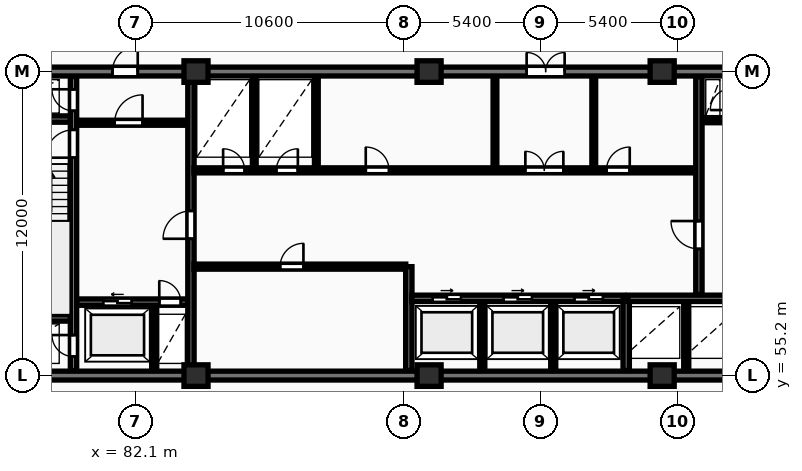
"""IFC4 building model, lengths in metres.
Left out: names, types, materials, properties, quantities, classifications, styles, units other than length and angle.
Written with IfcOpenShell. Run it as: python <this file> out.ifc"""

import sys

from ifc_helpers import new_model, si_unit, direction, frame, frame_2d, origin, origin_2d, place, context, subcontext, project, spatial, rectangle, extrude, element, fill, save


model = new_model("IFC4")
c1 = context("Model", 3, precision=1e-05, world=origin(), true_north=direction((0.0, 1.0)))
c2 = subcontext(c1, "Body", "Model", "MODEL_VIEW")
j1 = project(units=[si_unit("LENGTHUNIT", "METRE"), si_unit("PLANEANGLEUNIT", "RADIAN")], contexts=[c1])
p1 = place(None, origin())
s1 = spatial("IfcSite", under=j1, at=p1, CompositionType="ELEMENT")
p2 = place(p1, origin())
s2 = spatial("IfcBuilding", under=s1, at=p2, CompositionType="ELEMENT")
p3 = place(p2, frame((0.0, 0.0, 106.8)))
s3 = spatial("IfcBuildingStorey", under=s2, at=p3, CompositionType="ELEMENT", Elevation=106.8)
for number, where, z_axis, x_axis in (
    (1, (84.5, 55.2, 0.0), (0.0, 0.0, 1.0), (1.0, 0.0, 0.0)),
    (2, (84.5, 67.2, 0.0), (0.0, 0.0, 1.0), (1.0, 0.0, 0.0)),
    (3, (93.7, 55.2, 0.0), (0.0, 0.0, 1.0), (1.0, 0.0, 0.0)),
    (4, (93.7, 67.2, 0.0), (0.0, 0.0, 1.0), (1.0, 0.0, 0.0)),
    (5, (102.9, 55.2, 0.0), (0.0, 0.0, 1.0), (1.0, 0.0, 0.0)),
    (6, (102.9, 67.2, 0.0), (0.0, 0.0, 1.0), (1.0, 0.0, 0.0)),
):
    element("IfcColumn", number, at=place(p3, frame(where, z_axis=z_axis, x_axis=x_axis)), inside=s3, PredefinedType="COLUMN", context=c2, shape_type="SweptSolid", body=[
        extrude(rectangle(XDim=0.95, YDim=0.85, at=origin_2d()), origin(), (0.0, 0.0, 1.0), 3.25),
    ])
p4 = place(p3, frame((75.95, 55.2, 0.0), z_axis=(0.0, 0.0, 1.0), x_axis=(1.0, 0.0, 0.0)))
e7 = element("IfcWall", 7, at=p4, inside=s3, PredefinedType="SHEAR", context=c2, shape_type="SweptSolid", body=[
    extrude(rectangle(XDim=36.3, YDim=0.35, at=frame_2d((18.15, 0.0))), origin(), (0.0, 0.0, 1.0), 3.25),
])
p5 = place(p3, frame((75.95, 67.2, 0.0), z_axis=(0.0, 0.0, 1.0), x_axis=(1.0, 0.0, 0.0)))
e8 = element("IfcWall", 8, at=p5, inside=s3, PredefinedType="SHEAR", context=c2, shape_type="SweptSolid", body=[
    extrude(rectangle(XDim=36.3, YDim=0.35, at=frame_2d((18.15, 0.0))), origin(), (0.0, 0.0, 1.0), 3.25),
])
p6 = place(p5, frame((5.25, 0.0, 0.0)))
e9 = element("IfcOpeningElement", 9, at=p6, cuts=e8, PredefinedType="OPENING", context=c2, shape_type="SweptSolid", body=[
    extrude(rectangle(XDim=1.0, YDim=2.15, at=frame_2d((0.5, 1.075))), frame((0.0, 0.185, 0.0), z_axis=(0.0, -1.0, 0.0), x_axis=(1.0, 0.0, 0.0)), (0.0, 0.0, 1.0), 0.37),
])
p7 = place(p5, frame((21.6, 0.0, 0.0)))
e10 = element("IfcOpeningElement", 10, at=p7, cuts=e8, PredefinedType="OPENING", context=c2, shape_type="SweptSolid", body=[
    extrude(rectangle(XDim=1.5, YDim=2.2, at=frame_2d((0.75, 1.1))), frame((0.0, 0.185, 0.0), z_axis=(0.0, -1.0, 0.0), x_axis=(1.0, 0.0, 0.0)), (0.0, 0.0, 1.0), 0.37),
])
p8 = place(p5, frame((30.45, 0.0, 0.0)))
e11 = element("IfcOpeningElement", 11, at=p8, cuts=e8, PredefinedType="OPENING", context=c2, shape_type="SweptSolid", body=[
    extrude(rectangle(XDim=1.0, YDim=2.15, at=frame_2d((0.5, 1.075))), frame((0.0, 0.185, 0.0), z_axis=(0.0, -1.0, 0.0), x_axis=(1.0, 0.0, 0.0)), (0.0, 0.0, 1.0), 0.37),
])
p9 = place(p3, frame((79.665, 55.4, 0.0), z_axis=(0.0, 0.0, 1.0), x_axis=(0.0, 1.0, 0.0)))
e12 = element("IfcWall", 12, at=p9, inside=s3, PredefinedType="SHEAR", context=c2, shape_type="SweptSolid", body=[
    extrude(rectangle(XDim=11.6, YDim=0.25, at=frame_2d((5.8, 0.0))), origin(), (0.0, 0.0, 1.0), 3.25),
])
p10 = place(p9, frame((0.55, 0.0, 0.0)))
e13 = element("IfcOpeningElement", 13, at=p10, cuts=e12, PredefinedType="OPENING", context=c2, shape_type="SweptSolid", body=[
    extrude(rectangle(XDim=0.85, YDim=2.05, at=frame_2d((0.425, 1.025))), frame((0.0, 0.135, 0.0), z_axis=(0.0, -1.0, 0.0), x_axis=(1.0, 0.0, 0.0)), (0.0, 0.0, 1.0), 0.27),
])
p11 = place(p9, frame((8.4, 0.0, 0.0)))
e14 = element("IfcOpeningElement", 14, at=p11, cuts=e12, PredefinedType="OPENING", context=c2, shape_type="SweptSolid", body=[
    extrude(rectangle(XDim=1.1, YDim=2.1, at=frame_2d((0.55, 1.05))), frame((0.0, 0.135, 0.0), z_axis=(0.0, -1.0, 0.0), x_axis=(1.0, 0.0, 0.0)), (0.0, 0.0, 1.0), 0.27),
])
p12 = place(p9, frame((10.25, 0.0, 0.0)))
e15 = element("IfcOpeningElement", 15, at=p12, cuts=e12, PredefinedType="OPENING", context=c2, shape_type="SweptSolid", body=[
    extrude(rectangle(XDim=0.85, YDim=2.05, at=frame_2d((0.425, 1.025))), frame((0.0, 0.135, 0.0), z_axis=(0.0, -1.0, 0.0), x_axis=(1.0, 0.0, 0.0)), (0.0, 0.0, 1.0), 0.27),
])
for number, where, z_axis, x_axis in (
    (16, (76.3, 57.475, 0.0), (0.0, 0.0, 1.0), (1.0, 0.0, 0.0)),
    (17, (76.3, 65.325, 0.0), (0.0, 0.0, 1.0), (1.0, 0.0, 0.0)),
):
    element("IfcWall", number, at=place(p3, frame(where, z_axis=z_axis, x_axis=x_axis)), inside=s3, PredefinedType="SHEAR", context=c2, shape_type="SweptSolid", body=[
        extrude(rectangle(XDim=3.24, YDim=0.25, at=frame_2d((1.62, 0.0))), origin(), (0.0, 0.0, 1.0), 3.25),
    ])
p13 = place(p3, frame((79.79, 58.1, 0.0), z_axis=(0.0, 0.0, 1.0), x_axis=(1.0, 0.0, 0.0)))
e18 = element("IfcWall", 18, at=p13, inside=s3, PredefinedType="SHEAR", context=c2, shape_type="SweptSolid", body=[
    extrude(rectangle(XDim=4.39, YDim=0.25, at=frame_2d((2.195, 0.0))), origin(), (0.0, 0.0, 1.0), 3.25),
])
p14 = place(p13, frame((1.05, 0.0, 0.0)))
e19 = element("IfcOpeningElement", 19, at=p14, cuts=e18, PredefinedType="OPENING", context=c2, shape_type="SweptSolid", body=[
    extrude(rectangle(XDim=1.12, YDim=2.12, at=frame_2d((0.56, 1.06))), frame((0.0, 0.135, 0.0), z_axis=(0.0, -1.0, 0.0), x_axis=(1.0, 0.0, 0.0)), (0.0, 0.0, 1.0), 0.27),
])
p15 = place(p13, frame((3.26, 0.0, 0.0)))
e20 = element("IfcOpeningElement", 20, at=p15, cuts=e18, PredefinedType="OPENING", context=c2, shape_type="SweptSolid", body=[
    extrude(rectangle(XDim=0.85, YDim=2.05, at=frame_2d((0.425, 1.025))), frame((0.0, 0.135, 0.0), z_axis=(0.0, -1.0, 0.0), x_axis=(1.0, 0.0, 0.0)), (0.0, 0.0, 1.0), 0.27),
])
p16 = place(p3, frame((82.85, 55.4, 0.0), z_axis=(0.0, 0.0, 1.0), x_axis=(0.0, 1.0, 0.0)))
e21 = element("IfcWall", 21, at=p16, inside=s3, PredefinedType="PARTITIONING", context=c2, shape_type="SweptSolid", body=[
    extrude(rectangle(XDim=2.56, YDim=0.2, at=frame_2d((1.28, 0.0))), origin(), (0.0, 0.0, 1.0), 2.97),
])
p17 = place(p3, frame((79.79, 65.18, 0.0), z_axis=(0.0, 0.0, 1.0), x_axis=(1.0, 0.0, 0.0)))
e22 = element("IfcWall", 22, at=p17, inside=s3, PredefinedType="PARTITIONING", context=c2, shape_type="SweptSolid", body=[
    extrude(rectangle(XDim=4.39, YDim=0.2, at=frame_2d((2.195, 0.0))), origin(), (0.0, 0.0, 1.0), 2.97),
])
p18 = place(p17, frame((1.5, 0.0, 0.0)))
e23 = element("IfcOpeningElement", 23, at=p18, cuts=e22, PredefinedType="OPENING", context=c2, shape_type="SweptSolid", body=[
    extrude(rectangle(XDim=1.1, YDim=2.1, at=frame_2d((0.55, 1.05))), frame((0.0, 0.11, 0.0), z_axis=(0.0, -1.0, 0.0), x_axis=(1.0, 0.0, 0.0)), (0.0, 0.0, 1.0), 0.22),
])
p19 = place(p3, frame((84.3, 55.4, 0.0), z_axis=(0.0, 0.0, 1.0), x_axis=(0.0, 1.0, 0.0)))
e24 = element("IfcWall", 24, at=p19, inside=s3, PredefinedType="SHEAR", context=c2, shape_type="SweptSolid", body=[
    extrude(rectangle(XDim=11.6, YDim=0.25, at=frame_2d((5.8, 0.0))), origin(), (0.0, 0.0, 1.0), 3.25),
])
p20 = place(p19, frame((5.2, 0.0, 0.0)))
e25 = element("IfcOpeningElement", 25, at=p20, cuts=e24, PredefinedType="OPENING", context=c2, shape_type="SweptSolid", body=[
    extrude(rectangle(XDim=1.1, YDim=2.1, at=frame_2d((0.55, 1.05))), frame((0.0, 0.135, 0.0), z_axis=(0.0, -1.0, 0.0), x_axis=(1.0, 0.0, 0.0)), (0.0, 0.0, 1.0), 0.27),
])
p21 = place(p3, frame((84.42, 59.5, 0.0), z_axis=(0.0, 0.0, 1.0), x_axis=(1.0, 0.0, 0.0)))
e26 = element("IfcWall", 26, at=p21, inside=s3, PredefinedType="PARTITIONING", context=c2, shape_type="SweptSolid", body=[
    extrude(rectangle(XDim=8.36, YDim=0.2, at=frame_2d((4.18, 0.0))), origin(), (0.0, 0.0, 1.0), 2.97),
])
p22 = place(p21, frame((3.4, 0.0, 0.0)))
e27 = element("IfcOpeningElement", 27, at=p22, cuts=e26, PredefinedType="OPENING", context=c2, shape_type="SweptSolid", body=[
    extrude(rectangle(XDim=0.92, YDim=2.08, at=frame_2d((0.46, 1.04))), frame((0.0, 0.11, 0.0), z_axis=(0.0, -1.0, 0.0), x_axis=(1.0, 0.0, 0.0)), (0.0, 0.0, 1.0), 0.22),
])
p23 = place(p3, frame((92.9, 55.4, 0.0), z_axis=(0.0, 0.0, 1.0), x_axis=(0.0, 1.0, 0.0)))
e28 = element("IfcWall", 28, at=p23, inside=s3, PredefinedType="SHEAR", context=c2, shape_type="SweptSolid", body=[
    extrude(rectangle(XDim=4.1, YDim=0.25, at=frame_2d((2.05, 0.0))), origin(), (0.0, 0.0, 1.0), 3.25),
])
for number, where, z_axis, x_axis in (
    (29, (95.8, 55.4, 0.0), (0.0, 0.0, 1.0), (0.0, 1.0, 0.0)),
    (30, (98.6, 55.4, 0.0), (0.0, 0.0, 1.0), (0.0, 1.0, 0.0)),
):
    element("IfcWall", number, at=place(p3, frame(where, z_axis=z_axis, x_axis=x_axis)), inside=s3, PredefinedType="PARTITIONING", context=c2, shape_type="SweptSolid", body=[
        extrude(rectangle(XDim=2.72, YDim=0.2, at=frame_2d((1.36, 0.0))), origin(), (0.0, 0.0, 1.0), 2.97),
    ])
p24 = place(p3, frame((93.02, 58.25, 0.0), z_axis=(0.0, 0.0, 1.0), x_axis=(1.0, 0.0, 0.0)))
e31 = element("IfcWall", 31, at=p24, inside=s3, PredefinedType="SHEAR", context=c2, shape_type="SweptSolid", body=[
    extrude(rectangle(XDim=8.36, YDim=0.25, at=frame_2d((4.18, 0.0))), origin(), (0.0, 0.0, 1.0), 3.25),
])
p25 = place(p24, frame((0.82, 0.0, 0.0)))
e32 = element("IfcOpeningElement", 32, at=p25, cuts=e31, PredefinedType="OPENING", context=c2, shape_type="SweptSolid", body=[
    extrude(rectangle(XDim=1.12, YDim=2.12, at=frame_2d((0.56, 1.06))), frame((0.0, 0.135, 0.0), z_axis=(0.0, -1.0, 0.0), x_axis=(1.0, 0.0, 0.0)), (0.0, 0.0, 1.0), 0.27),
])
p26 = place(p24, frame((3.62, 0.0, 0.0)))
e33 = element("IfcOpeningElement", 33, at=p26, cuts=e31, PredefinedType="OPENING", context=c2, shape_type="SweptSolid", body=[
    extrude(rectangle(XDim=1.12, YDim=2.12, at=frame_2d((0.56, 1.06))), frame((0.0, 0.135, 0.0), z_axis=(0.0, -1.0, 0.0), x_axis=(1.0, 0.0, 0.0)), (0.0, 0.0, 1.0), 0.27),
])
p27 = place(p24, frame((6.42, 0.0, 0.0)))
e34 = element("IfcOpeningElement", 34, at=p27, cuts=e31, PredefinedType="OPENING", context=c2, shape_type="SweptSolid", body=[
    extrude(rectangle(XDim=1.12, YDim=2.12, at=frame_2d((0.56, 1.06))), frame((0.0, 0.135, 0.0), z_axis=(0.0, -1.0, 0.0), x_axis=(1.0, 0.0, 0.0)), (0.0, 0.0, 1.0), 0.27),
])
p28 = place(p3, frame((101.48, 55.4, 0.0), z_axis=(0.0, 0.0, 1.0), x_axis=(0.0, 1.0, 0.0)))
e35 = element("IfcWall", 35, at=p28, inside=s3, PredefinedType="SHEAR", context=c2, shape_type="SweptSolid", body=[
    extrude(rectangle(XDim=2.85, YDim=0.25, at=frame_2d((1.425, 0.0))), origin(), (0.0, 0.0, 1.0), 3.25),
])
p29 = place(p3, frame((103.85, 55.4, 0.0), z_axis=(0.0, 0.0, 1.0), x_axis=(0.0, 1.0, 0.0)))
e36 = element("IfcWall", 36, at=p29, inside=s3, PredefinedType="PARTITIONING", context=c2, shape_type="SweptSolid", body=[
    extrude(rectangle(XDim=2.72, YDim=0.2, at=frame_2d((1.36, 0.0))), origin(), (0.0, 0.0, 1.0), 2.97),
])
p30 = place(p3, frame((101.55, 58.25, 0.0), z_axis=(0.0, 0.0, 1.0), x_axis=(1.0, 0.0, 0.0)))
e37 = element("IfcWall", 37, at=p30, inside=s3, PredefinedType="SHEAR", context=c2, shape_type="SweptSolid", body=[
    extrude(rectangle(XDim=4.6, YDim=0.25, at=frame_2d((2.3, 0.0))), origin(), (0.0, 0.0, 1.0), 3.25),
])
for number, where, z_axis, x_axis in (
    (38, (86.8, 63.4, 0.0), (0.0, 0.0, 1.0), (0.0, 1.0, 0.0)),
    (39, (89.25, 63.4, 0.0), (0.0, 0.0, 1.0), (0.0, 1.0, 0.0)),
    (40, (96.3, 63.4, 0.0), (0.0, 0.0, 1.0), (0.0, 1.0, 0.0)),
    (41, (100.2, 63.4, 0.0), (0.0, 0.0, 1.0), (0.0, 1.0, 0.0)),
):
    element("IfcWall", number, at=place(p3, frame(where, z_axis=z_axis, x_axis=x_axis)), inside=s3, PredefinedType="PARTITIONING", context=c2, shape_type="SweptSolid", body=[
        extrude(rectangle(XDim=3.6, YDim=0.15, at=frame_2d((1.8, 0.0))), origin(), (0.0, 0.0, 1.0), 2.97),
    ])
p31 = place(p3, frame((84.42, 63.3, 0.0), z_axis=(0.0, 0.0, 1.0), x_axis=(1.0, 0.0, 0.0)))
e42 = element("IfcWall", 42, at=p31, inside=s3, PredefinedType="PARTITIONING", context=c2, shape_type="SweptSolid", body=[
    extrude(rectangle(XDim=19.83, YDim=0.2, at=frame_2d((9.915, 0.0))), origin(), (0.0, 0.0, 1.0), 2.97),
])
p32 = place(p31, frame((1.15, 0.0, 0.0)))
e43 = element("IfcOpeningElement", 43, at=p32, cuts=e42, PredefinedType="OPENING", context=c2, shape_type="SweptSolid", body=[
    extrude(rectangle(XDim=0.85, YDim=2.05, at=frame_2d((0.425, 1.025))), frame((0.0, 0.11, 0.0), z_axis=(0.0, -1.0, 0.0), x_axis=(1.0, 0.0, 0.0)), (0.0, 0.0, 1.0), 0.22),
])
p33 = place(p31, frame((3.25, 0.0, 0.0)))
e44 = element("IfcOpeningElement", 44, at=p33, cuts=e42, PredefinedType="OPENING", context=c2, shape_type="SweptSolid", body=[
    extrude(rectangle(XDim=0.85, YDim=2.05, at=frame_2d((0.425, 1.025))), frame((0.0, 0.11, 0.0), z_axis=(0.0, -1.0, 0.0), x_axis=(1.0, 0.0, 0.0)), (0.0, 0.0, 1.0), 0.22),
])
p34 = place(p31, frame((13.08, 0.0, 0.0)))
e45 = element("IfcOpeningElement", 45, at=p34, cuts=e42, PredefinedType="OPENING", context=c2, shape_type="SweptSolid", body=[
    extrude(rectangle(XDim=1.5, YDim=2.2, at=frame_2d((0.75, 1.1))), frame((0.0, 0.11, 0.0), z_axis=(0.0, -1.0, 0.0), x_axis=(1.0, 0.0, 0.0)), (0.0, 0.0, 1.0), 0.22),
])
p35 = place(p31, frame((6.78, 0.0, 0.0)))
e46 = element("IfcOpeningElement", 46, at=p35, cuts=e42, PredefinedType="OPENING", context=c2, shape_type="SweptSolid", body=[
    extrude(rectangle(XDim=0.92, YDim=2.08, at=frame_2d((0.46, 1.04))), frame((0.0, 0.11, 0.0), z_axis=(0.0, -1.0, 0.0), x_axis=(1.0, 0.0, 0.0)), (0.0, 0.0, 1.0), 0.22),
])
p36 = place(p31, frame((16.28, 0.0, 0.0)))
e47 = element("IfcOpeningElement", 47, at=p36, cuts=e42, PredefinedType="OPENING", context=c2, shape_type="SweptSolid", body=[
    extrude(rectangle(XDim=0.92, YDim=2.08, at=frame_2d((0.46, 1.04))), frame((0.0, 0.11, 0.0), z_axis=(0.0, -1.0, 0.0), x_axis=(1.0, 0.0, 0.0)), (0.0, 0.0, 1.0), 0.22),
])
p37 = place(p3, frame((104.45, 65.28, 0.0), z_axis=(0.0, 0.0, 1.0), x_axis=(1.0, 0.0, 0.0)))
e48 = element("IfcWall", 48, at=p37, inside=s3, PredefinedType="PARTITIONING", context=c2, shape_type="SweptSolid", body=[
    extrude(rectangle(XDim=1.2, YDim=0.2, at=frame_2d((0.6, 0.0))), origin(), (0.0, 0.0, 1.0), 2.97),
])
p38 = place(p3, frame((104.35, 58.4, 0.0), z_axis=(0.0, 0.0, 1.0), x_axis=(0.0, 1.0, 0.0)))
e49 = element("IfcWall", 49, at=p38, inside=s3, PredefinedType="SHEAR", context=c2, shape_type="SweptSolid", body=[
    extrude(rectangle(XDim=8.6, YDim=0.25, at=frame_2d((4.3, 0.0))), origin(), (0.0, 0.0, 1.0), 3.25),
])
p39 = place(p38, frame((1.8, 0.0, 0.0)))
e50 = element("IfcOpeningElement", 50, at=p39, cuts=e49, PredefinedType="OPENING", context=c2, shape_type="SweptSolid", body=[
    extrude(rectangle(XDim=1.1, YDim=2.1, at=frame_2d((0.55, 1.05))), frame((0.0, 0.135, 0.0), z_axis=(0.0, -1.0, 0.0), x_axis=(1.0, 0.0, 0.0)), (0.0, 0.0, 1.0), 0.27),
])
p40 = place(p6, origin())
e51 = element("IfcDoor", 51, at=p40, inside=s3, OperationType="SINGLE_SWING_RIGHT", PredefinedType="DOOR", context=c2, shape_type="SweptSolid", body=[
    extrude(rectangle(XDim=1.0, YDim=2.15, at=frame_2d((0.5, 1.075))), frame((0.0, 0.025, 0.0), z_axis=(0.0, -1.0, 0.0), x_axis=(1.0, 0.0, 0.0)), (0.0, 0.0, 1.0), 0.05),
])
fill(e9, e51)
p41 = place(p7, origin())
e52 = element("IfcDoor", 52, at=p41, inside=s3, OperationType="DOUBLE_DOOR_SINGLE_SWING", PredefinedType="DOOR", context=c2, shape_type="SweptSolid", body=[
    extrude(rectangle(XDim=1.5, YDim=2.2, at=frame_2d((0.75, 1.1))), frame((0.0, 0.025, 0.0), z_axis=(0.0, -1.0, 0.0), x_axis=(1.0, 0.0, 0.0)), (0.0, 0.0, 1.0), 0.05),
])
fill(e10, e52)
p42 = place(p10, origin())
e53 = element("IfcDoor", 53, at=p42, inside=s3, OperationType="SINGLE_SWING_RIGHT", PredefinedType="DOOR", context=c2, shape_type="SweptSolid", body=[
    extrude(rectangle(XDim=0.85, YDim=2.05, at=frame_2d((0.425, 1.025))), frame((0.0, 0.025, 0.0), z_axis=(0.0, -1.0, 0.0), x_axis=(1.0, 0.0, 0.0)), (0.0, 0.0, 1.0), 0.05),
])
fill(e13, e53)
p43 = place(p11, origin())
e54 = element("IfcDoor", 54, at=p43, inside=s3, OperationType="SINGLE_SWING_LEFT", PredefinedType="DOOR", context=c2, shape_type="SweptSolid", body=[
    extrude(rectangle(XDim=1.1, YDim=2.1, at=frame_2d((0.55, 1.05))), frame((0.0, 0.025, 0.0), z_axis=(0.0, -1.0, 0.0), x_axis=(1.0, 0.0, 0.0)), (0.0, 0.0, 1.0), 0.05),
])
fill(e14, e54)
p44 = place(p12, origin())
e55 = element("IfcDoor", 55, at=p44, inside=s3, OperationType="SINGLE_SWING_RIGHT", PredefinedType="DOOR", context=c2, shape_type="SweptSolid", body=[
    extrude(rectangle(XDim=0.85, YDim=2.05, at=frame_2d((0.425, 1.025))), frame((0.0, 0.025, 0.0), z_axis=(0.0, -1.0, 0.0), x_axis=(1.0, 0.0, 0.0)), (0.0, 0.0, 1.0), 0.05),
])
fill(e15, e55)
p45 = place(p14, origin())
e56 = element("IfcDoor", 56, at=p45, inside=s3, OperationType="SLIDING_TO_LEFT", PredefinedType="DOOR", context=c2, shape_type="SweptSolid", body=[
    extrude(rectangle(XDim=1.12, YDim=2.12, at=frame_2d((0.56, 1.06))), frame((0.0, 0.025, 0.0), z_axis=(0.0, -1.0, 0.0), x_axis=(1.0, 0.0, 0.0)), (0.0, 0.0, 1.0), 0.05),
])
fill(e19, e56)
p46 = place(p15, origin())
e57 = element("IfcDoor", 57, at=p46, inside=s3, OperationType="SINGLE_SWING_LEFT", PredefinedType="DOOR", context=c2, shape_type="SweptSolid", body=[
    extrude(rectangle(XDim=0.85, YDim=2.05, at=frame_2d((0.425, 1.025))), frame((0.0, 0.025, 0.0), z_axis=(0.0, -1.0, 0.0), x_axis=(1.0, 0.0, 0.0)), (0.0, 0.0, 1.0), 0.05),
])
fill(e20, e57)
p47 = place(p18, origin())
e58 = element("IfcDoor", 58, at=p47, inside=s3, OperationType="SINGLE_SWING_RIGHT", PredefinedType="DOOR", context=c2, shape_type="SweptSolid", body=[
    extrude(rectangle(XDim=1.1, YDim=2.1, at=frame_2d((0.55, 1.05))), frame((0.0, 0.025, 0.0), z_axis=(0.0, -1.0, 0.0), x_axis=(1.0, 0.0, 0.0)), (0.0, 0.0, 1.0), 0.05),
])
fill(e23, e58)
p48 = place(p20, origin())
e59 = element("IfcDoor", 59, at=p48, inside=s3, OperationType="SINGLE_SWING_LEFT", PredefinedType="DOOR", context=c2, shape_type="SweptSolid", body=[
    extrude(rectangle(XDim=1.1, YDim=2.1, at=frame_2d((0.55, 1.05))), frame((0.0, 0.025, 0.0), z_axis=(0.0, -1.0, 0.0), x_axis=(1.0, 0.0, 0.0)), (0.0, 0.0, 1.0), 0.05),
])
fill(e25, e59)
p49 = place(p22, origin())
e60 = element("IfcDoor", 60, at=p49, inside=s3, OperationType="SINGLE_SWING_RIGHT", PredefinedType="DOOR", context=c2, shape_type="SweptSolid", body=[
    extrude(rectangle(XDim=0.92, YDim=2.08, at=frame_2d((0.46, 1.04))), frame((0.0, 0.025, 0.0), z_axis=(0.0, -1.0, 0.0), x_axis=(1.0, 0.0, 0.0)), (0.0, 0.0, 1.0), 0.05),
])
fill(e27, e60)
p50 = place(p25, origin())
e61 = element("IfcDoor", 61, at=p50, inside=s3, OperationType="SLIDING_TO_RIGHT", PredefinedType="DOOR", context=c2, shape_type="SweptSolid", body=[
    extrude(rectangle(XDim=1.12, YDim=2.12, at=frame_2d((0.56, 1.06))), frame((0.0, 0.025, 0.0), z_axis=(0.0, -1.0, 0.0), x_axis=(1.0, 0.0, 0.0)), (0.0, 0.0, 1.0), 0.05),
])
fill(e32, e61)
p51 = place(p26, origin())
e62 = element("IfcDoor", 62, at=p51, inside=s3, OperationType="SLIDING_TO_RIGHT", PredefinedType="DOOR", context=c2, shape_type="SweptSolid", body=[
    extrude(rectangle(XDim=1.12, YDim=2.12, at=frame_2d((0.56, 1.06))), frame((0.0, 0.025, 0.0), z_axis=(0.0, -1.0, 0.0), x_axis=(1.0, 0.0, 0.0)), (0.0, 0.0, 1.0), 0.05),
])
fill(e33, e62)
p52 = place(p27, origin())
e63 = element("IfcDoor", 63, at=p52, inside=s3, OperationType="SLIDING_TO_RIGHT", PredefinedType="DOOR", context=c2, shape_type="SweptSolid", body=[
    extrude(rectangle(XDim=1.12, YDim=2.12, at=frame_2d((0.56, 1.06))), frame((0.0, 0.025, 0.0), z_axis=(0.0, -1.0, 0.0), x_axis=(1.0, 0.0, 0.0)), (0.0, 0.0, 1.0), 0.05),
])
fill(e34, e63)
p53 = place(p32, origin())
e64 = element("IfcDoor", 64, at=p53, inside=s3, OperationType="SINGLE_SWING_LEFT", PredefinedType="DOOR", context=c2, shape_type="SweptSolid", body=[
    extrude(rectangle(XDim=0.85, YDim=2.05, at=frame_2d((0.425, 1.025))), frame((0.0, 0.025, 0.0), z_axis=(0.0, -1.0, 0.0), x_axis=(1.0, 0.0, 0.0)), (0.0, 0.0, 1.0), 0.05),
])
fill(e43, e64)
p54 = place(p33, origin())
e65 = element("IfcDoor", 65, at=p54, inside=s3, OperationType="SINGLE_SWING_RIGHT", PredefinedType="DOOR", context=c2, shape_type="SweptSolid", body=[
    extrude(rectangle(XDim=0.85, YDim=2.05, at=frame_2d((0.425, 1.025))), frame((0.0, 0.025, 0.0), z_axis=(0.0, -1.0, 0.0), x_axis=(1.0, 0.0, 0.0)), (0.0, 0.0, 1.0), 0.05),
])
fill(e44, e65)
p55 = place(p34, origin())
e66 = element("IfcDoor", 66, at=p55, inside=s3, OperationType="DOUBLE_DOOR_SINGLE_SWING", PredefinedType="DOOR", context=c2, shape_type="SweptSolid", body=[
    extrude(rectangle(XDim=1.5, YDim=2.2, at=frame_2d((0.75, 1.1))), frame((0.0, 0.025, 0.0), z_axis=(0.0, -1.0, 0.0), x_axis=(1.0, 0.0, 0.0)), (0.0, 0.0, 1.0), 0.05),
])
fill(e45, e66)
p56 = place(p35, origin())
e67 = element("IfcDoor", 67, at=p56, inside=s3, OperationType="SINGLE_SWING_LEFT", PredefinedType="DOOR", context=c2, shape_type="SweptSolid", body=[
    extrude(rectangle(XDim=0.92, YDim=2.08, at=frame_2d((0.46, 1.04))), frame((0.0, 0.025, 0.0), z_axis=(0.0, -1.0, 0.0), x_axis=(1.0, 0.0, 0.0)), (0.0, 0.0, 1.0), 0.05),
])
fill(e46, e67)
p57 = place(p36, origin())
e68 = element("IfcDoor", 68, at=p57, inside=s3, OperationType="SINGLE_SWING_RIGHT", PredefinedType="DOOR", context=c2, shape_type="SweptSolid", body=[
    extrude(rectangle(XDim=0.92, YDim=2.08, at=frame_2d((0.46, 1.04))), frame((0.0, 0.025, 0.0), z_axis=(0.0, -1.0, 0.0), x_axis=(1.0, 0.0, 0.0)), (0.0, 0.0, 1.0), 0.05),
])
fill(e47, e68)
p58 = place(p39, origin())
e69 = element("IfcDoor", 69, at=p58, inside=s3, OperationType="SINGLE_SWING_RIGHT", PredefinedType="DOOR", context=c2, shape_type="SweptSolid", body=[
    extrude(rectangle(XDim=1.1, YDim=2.1, at=frame_2d((0.55, 1.05))), frame((0.0, 0.025, 0.0), z_axis=(0.0, -1.0, 0.0), x_axis=(1.0, 0.0, 0.0)), (0.0, 0.0, 1.0), 0.05),
])
fill(e50, e69)
save(model, sys.argv[1])
